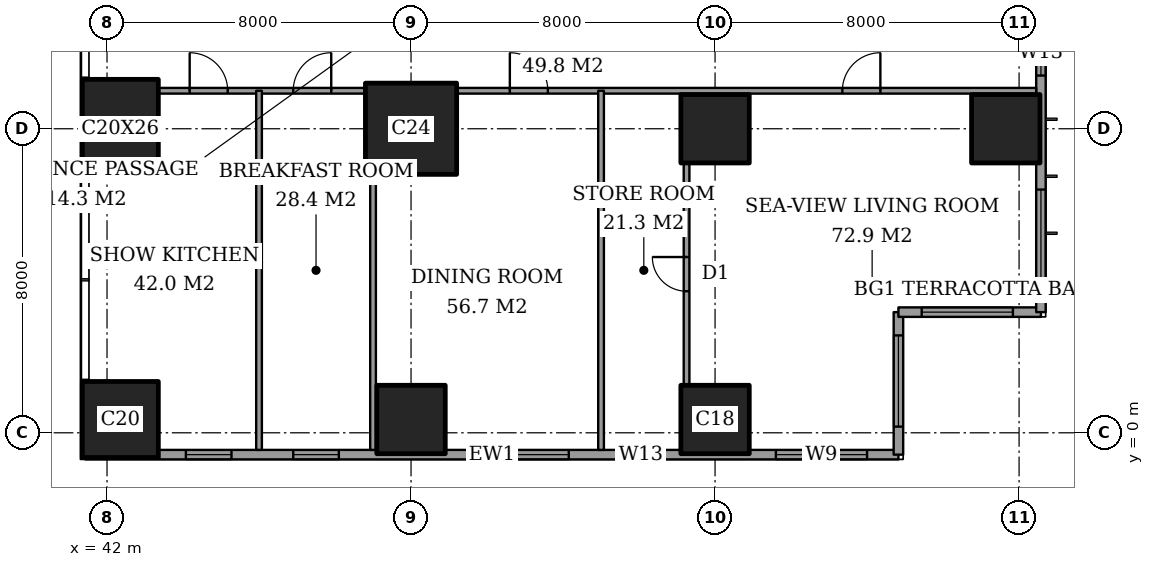
"""IFC4 building model, lengths in metres.
Left out: names, types, materials, properties, quantities, classifications, styles, units other than length and angle.
Written with IfcOpenShell. Run it as: python <this file> out.ifc"""

import sys

from ifc_helpers import new_model, si_unit, direction, frame, frame_2d, origin, origin_2d, place, context, subcontext, project, spatial, rectangle, extrude, element, fill, save


model = new_model("IFC4")
c1 = context("Model", 3, precision=1e-05, world=origin(), true_north=direction((0.0, 1.0)))
c2 = subcontext(c1, "Body", "Model", "MODEL_VIEW")
j1 = project(units=[si_unit("LENGTHUNIT", "METRE"), si_unit("PLANEANGLEUNIT", "RADIAN")], contexts=[c1])
p1 = place(None, origin())
s1 = spatial("IfcSite", under=j1, at=p1, CompositionType="ELEMENT")
p2 = place(p1, origin())
s2 = spatial("IfcBuilding", under=s1, at=p2, CompositionType="ELEMENT")
p3 = place(p2, frame((0.0, 0.0, 214.6)))
s3 = spatial("IfcBuildingStorey", under=s2, at=p3, CompositionType="ELEMENT", Elevation=214.6)
p4 = place(p3, frame((42.35, 0.35, 0.0), z_axis=(0.0, 0.0, 1.0), x_axis=(1.0, 0.0, 0.0)))
e1 = element("IfcColumn", 1, at=p4, inside=s3, PredefinedType="COLUMN", context=c2, shape_type="SweptSolid", body=[
    extrude(rectangle(XDim=2.0, YDim=2.0, at=origin_2d()), origin(), (0.0, 0.0, 1.0), 3.6),
])
p5 = place(p3, frame((42.35, 8.0, 0.0), z_axis=(0.0, 0.0, 1.0), x_axis=(1.0, 0.0, 0.0)))
e2 = element("IfcColumn", 2, at=p5, inside=s3, PredefinedType="COLUMN", context=c2, shape_type="SweptSolid", body=[
    extrude(rectangle(XDim=2.0, YDim=2.6, at=origin_2d()), origin(), (0.0, 0.0, 1.0), 3.6),
])
p6 = place(p3, frame((50.0, 0.35, 0.0), z_axis=(0.0, 0.0, 1.0), x_axis=(1.0, 0.0, 0.0)))
e3 = element("IfcColumn", 3, at=p6, inside=s3, PredefinedType="COLUMN", context=c2, shape_type="SweptSolid", body=[
    extrude(rectangle(XDim=1.8, YDim=1.8, at=origin_2d()), origin(), (0.0, 0.0, 1.0), 3.6),
])
p7 = place(p3, frame((50.0, 8.0, 0.0), z_axis=(0.0, 0.0, 1.0), x_axis=(1.0, 0.0, 0.0)))
e4 = element("IfcColumn", 4, at=p7, inside=s3, PredefinedType="COLUMN", context=c2, shape_type="SweptSolid", body=[
    extrude(rectangle(XDim=2.4, YDim=2.4, at=origin_2d()), origin(), (0.0, 0.0, 1.0), 3.6),
])
for number, where, z_axis, x_axis in (
    (5, (58.0, 0.35, 0.0), (0.0, 0.0, 1.0), (1.0, 0.0, 0.0)),
    (6, (58.0, 8.0, 0.0), (0.0, 0.0, 1.0), (1.0, 0.0, 0.0)),
    (7, (65.65, 8.0, 0.0), (0.0, 0.0, 1.0), (1.0, 0.0, 0.0)),
):
    element("IfcColumn", number, at=place(p3, frame(where, z_axis=z_axis, x_axis=x_axis)), inside=s3, PredefinedType="COLUMN", context=c2, shape_type="SweptSolid", body=[
        extrude(rectangle(XDim=1.8, YDim=1.8, at=origin_2d()), origin(), (0.0, 0.0, 1.0), 3.6),
    ])
p8 = place(p3, frame((41.425, -0.575, 0.0), z_axis=(0.0, 0.0, 1.0), x_axis=(1.0, 0.0, 0.0)))
e8 = element("IfcWall", 8, at=p8, inside=s3, PredefinedType="SOLIDWALL", context=c2, shape_type="SweptSolid", body=[
    extrude(rectangle(XDim=21.4, YDim=0.25, at=frame_2d((10.7, 0.0))), origin(), (0.0, 0.0, 1.0), 3.6),
])
p9 = place(p8, frame((2.65, 0.0, 0.2)))
e9 = element("IfcOpeningElement", 9, at=p9, cuts=e8, PredefinedType="OPENING", context=c2, shape_type="SweptSolid", body=[
    extrude(rectangle(XDim=1.2, YDim=2.4, at=frame_2d((0.6, 1.2))), frame((0.0, 0.135, 0.0), z_axis=(0.0, -1.0, 0.0), x_axis=(1.0, 0.0, 0.0)), (0.0, 0.0, 1.0), 0.27),
])
p10 = place(p8, frame((5.475, 0.0, 0.2)))
e10 = element("IfcOpeningElement", 10, at=p10, cuts=e8, PredefinedType="OPENING", context=c2, shape_type="SweptSolid", body=[
    extrude(rectangle(XDim=1.2, YDim=2.4, at=frame_2d((0.6, 1.2))), frame((0.0, 0.135, 0.0), z_axis=(0.0, -1.0, 0.0), x_axis=(1.0, 0.0, 0.0)), (0.0, 0.0, 1.0), 0.27),
])
p11 = place(p8, frame((10.325, 0.0, 0.2)))
e11 = element("IfcOpeningElement", 11, at=p11, cuts=e8, PredefinedType="OPENING", context=c2, shape_type="SweptSolid", body=[
    extrude(rectangle(XDim=2.4, YDim=2.4, at=frame_2d((1.2, 1.2))), frame((0.0, 0.135, 0.0), z_axis=(0.0, -1.0, 0.0), x_axis=(1.0, 0.0, 0.0)), (0.0, 0.0, 1.0), 0.27),
])
p12 = place(p8, frame((14.025, 0.0, 0.2)))
e12 = element("IfcOpeningElement", 12, at=p12, cuts=e8, PredefinedType="OPENING", context=c2, shape_type="SweptSolid", body=[
    extrude(rectangle(XDim=1.2, YDim=2.4, at=frame_2d((0.6, 1.2))), frame((0.0, 0.135, 0.0), z_axis=(0.0, -1.0, 0.0), x_axis=(1.0, 0.0, 0.0)), (0.0, 0.0, 1.0), 0.27),
])
p13 = place(p8, frame((18.175, 0.0, 0.2)))
e13 = element("IfcOpeningElement", 13, at=p13, cuts=e8, PredefinedType="OPENING", context=c2, shape_type="SweptSolid", body=[
    extrude(rectangle(XDim=2.4, YDim=2.4, at=frame_2d((1.2, 1.2))), frame((0.0, 0.135, 0.0), z_axis=(0.0, -1.0, 0.0), x_axis=(1.0, 0.0, 0.0)), (0.0, 0.0, 1.0), 0.27),
])
p14 = place(p3, frame((62.825, -0.575, 0.0), z_axis=(0.0, 0.0, 1.0), x_axis=(0.0, 1.0, 0.0)))
e14 = element("IfcWall", 14, at=p14, inside=s3, PredefinedType="SOLIDWALL", context=c2, shape_type="SweptSolid", body=[
    extrude(rectangle(XDim=3.75, YDim=0.25, at=frame_2d((1.875, 0.0))), origin(), (0.0, 0.0, 1.0), 3.6),
])
p15 = place(p14, frame((0.738, 0.0, 0.2)))
e15 = element("IfcOpeningElement", 15, at=p15, cuts=e14, PredefinedType="OPENING", context=c2, shape_type="SweptSolid", body=[
    extrude(rectangle(XDim=2.4, YDim=2.4, at=frame_2d((1.2, 1.2))), frame((0.0, 0.135, 0.0), z_axis=(0.0, -1.0, 0.0), x_axis=(1.0, 0.0, 0.0)), (0.0, 0.0, 1.0), 0.27),
])
p16 = place(p3, frame((62.825, 3.175, 0.0), z_axis=(0.0, 0.0, 1.0), x_axis=(1.0, 0.0, 0.0)))
e16 = element("IfcWall", 16, at=p16, inside=s3, PredefinedType="SOLIDWALL", context=c2, shape_type="SweptSolid", body=[
    extrude(rectangle(XDim=3.75, YDim=0.25, at=frame_2d((1.875, 0.0))), origin(), (0.0, 0.0, 1.0), 3.6),
])
p17 = place(p16, frame((0.613, 0.0, 0.2)))
e17 = element("IfcOpeningElement", 17, at=p17, cuts=e16, PredefinedType="OPENING", context=c2, shape_type="SweptSolid", body=[
    extrude(rectangle(XDim=2.4, YDim=2.4, at=frame_2d((1.2, 1.2))), frame((0.0, 0.135, 0.0), z_axis=(0.0, -1.0, 0.0), x_axis=(1.0, 0.0, 0.0)), (0.0, 0.0, 1.0), 0.27),
])
p18 = place(p3, frame((66.575, 3.175, 0.0), z_axis=(0.0, 0.0, 1.0), x_axis=(0.0, 1.0, 0.0)))
e18 = element("IfcWall", 18, at=p18, inside=s3, PredefinedType="SOLIDWALL", context=c2, shape_type="SweptSolid", body=[
    extrude(rectangle(XDim=41.65, YDim=0.25, at=frame_2d((20.825, 0.0))), origin(), (0.0, 0.0, 1.0), 3.6),
])
p19 = place(p18, frame((0.825, 0.0, 0.2)))
e19 = element("IfcOpeningElement", 19, at=p19, cuts=e18, PredefinedType="OPENING", context=c2, shape_type="SweptSolid", body=[
    extrude(rectangle(XDim=2.4, YDim=2.4, at=frame_2d((1.2, 1.2))), frame((0.0, 0.135, 0.0), z_axis=(0.0, -1.0, 0.0), x_axis=(1.0, 0.0, 0.0)), (0.0, 0.0, 1.0), 0.27),
])
p20 = place(p18, frame((6.225, 0.0, 0.2)))
e20 = element("IfcOpeningElement", 20, at=p20, cuts=e18, PredefinedType="OPENING", context=c2, shape_type="SweptSolid", body=[
    extrude(rectangle(XDim=1.2, YDim=2.4, at=frame_2d((0.6, 1.2))), frame((0.0, 0.135, 0.0), z_axis=(0.0, -1.0, 0.0), x_axis=(1.0, 0.0, 0.0)), (0.0, 0.0, 1.0), 0.27),
])
p21 = place(p18, frame((8.675, 0.0, 0.2)))
e21 = element("IfcOpeningElement", 21, at=p21, cuts=e18, PredefinedType="OPENING", context=c2, shape_type="SweptSolid", body=[
    extrude(rectangle(XDim=2.4, YDim=2.4, at=frame_2d((1.2, 1.2))), frame((0.0, 0.135, 0.0), z_axis=(0.0, -1.0, 0.0), x_axis=(1.0, 0.0, 0.0)), (0.0, 0.0, 1.0), 0.27),
])
p22 = place(p18, frame((15.675, 0.0, 0.2)))
e22 = element("IfcOpeningElement", 22, at=p22, cuts=e18, PredefinedType="OPENING", context=c2, shape_type="SweptSolid", body=[
    extrude(rectangle(XDim=2.4, YDim=2.4, at=frame_2d((1.2, 1.2))), frame((0.0, 0.135, 0.0), z_axis=(0.0, -1.0, 0.0), x_axis=(1.0, 0.0, 0.0)), (0.0, 0.0, 1.0), 0.27),
])
p23 = place(p18, frame((23.575, 0.0, 0.2)))
e23 = element("IfcOpeningElement", 23, at=p23, cuts=e18, PredefinedType="OPENING", context=c2, shape_type="SweptSolid", body=[
    extrude(rectangle(XDim=2.4, YDim=2.4, at=frame_2d((1.2, 1.2))), frame((0.0, 0.135, 0.0), z_axis=(0.0, -1.0, 0.0), x_axis=(1.0, 0.0, 0.0)), (0.0, 0.0, 1.0), 0.27),
])
p24 = place(p18, frame((30.775, 0.0, 0.2)))
e24 = element("IfcOpeningElement", 24, at=p24, cuts=e18, PredefinedType="OPENING", context=c2, shape_type="SweptSolid", body=[
    extrude(rectangle(XDim=2.4, YDim=2.4, at=frame_2d((1.2, 1.2))), frame((0.0, 0.135, 0.0), z_axis=(0.0, -1.0, 0.0), x_axis=(1.0, 0.0, 0.0)), (0.0, 0.0, 1.0), 0.27),
])
p25 = place(p18, frame((34.55, 0.0, 0.2)))
e25 = element("IfcOpeningElement", 25, at=p25, cuts=e18, PredefinedType="OPENING", context=c2, shape_type="SweptSolid", body=[
    extrude(rectangle(XDim=1.2, YDim=2.4, at=frame_2d((0.6, 1.2))), frame((0.0, 0.135, 0.0), z_axis=(0.0, -1.0, 0.0), x_axis=(1.0, 0.0, 0.0)), (0.0, 0.0, 1.0), 0.27),
])
p26 = place(p18, frame((38.425, 0.0, 0.2)))
e26 = element("IfcOpeningElement", 26, at=p26, cuts=e18, PredefinedType="OPENING", context=c2, shape_type="SweptSolid", body=[
    extrude(rectangle(XDim=2.4, YDim=2.4, at=frame_2d((1.2, 1.2))), frame((0.0, 0.135, 0.0), z_axis=(0.0, -1.0, 0.0), x_axis=(1.0, 0.0, 0.0)), (0.0, 0.0, 1.0), 0.27),
])
p27 = place(p3, frame((43.35, 9.0, 0.0), z_axis=(0.0, 0.0, 1.0), x_axis=(1.0, 0.0, 0.0)))
e27 = element("IfcWall", 27, at=p27, inside=s3, PredefinedType="PARTITIONING", context=c2, shape_type="SweptSolid", body=[
    extrude(rectangle(XDim=5.45, YDim=0.15, at=frame_2d((2.725, 0.0))), origin(), (0.0, 0.0, 1.0), 3.35),
])
p28 = place(p27, frame((3.55, 0.0, 0.0)))
e28 = element("IfcOpeningElement", 28, at=p28, cuts=e27, PredefinedType="OPENING", context=c2, shape_type="SweptSolid", body=[
    extrude(rectangle(XDim=1.0, YDim=2.1, at=frame_2d((0.5, 1.05))), frame((0.0, 0.085, 0.0), z_axis=(0.0, -1.0, 0.0), x_axis=(1.0, 0.0, 0.0)), (0.0, 0.0, 1.0), 0.17),
])
p29 = place(p27, frame((0.825, 0.0, 0.0)))
e29 = element("IfcOpeningElement", 29, at=p29, cuts=e27, PredefinedType="OPENING", context=c2, shape_type="SweptSolid", body=[
    extrude(rectangle(XDim=1.0, YDim=2.1, at=frame_2d((0.5, 1.05))), frame((0.0, 0.085, 0.0), z_axis=(0.0, -1.0, 0.0), x_axis=(1.0, 0.0, 0.0)), (0.0, 0.0, 1.0), 0.17),
])
p30 = place(p3, frame((51.2, 9.0, 0.0), z_axis=(0.0, 0.0, 1.0), x_axis=(1.0, 0.0, 0.0)))
e30 = element("IfcWall", 30, at=p30, inside=s3, PredefinedType="PARTITIONING", context=c2, shape_type="SweptSolid", body=[
    extrude(rectangle(XDim=15.25, YDim=0.15, at=frame_2d((7.625, 0.0))), origin(), (0.0, 0.0, 1.0), 3.35),
])
p31 = place(p30, frame((10.15, 0.0, 0.0)))
e31 = element("IfcOpeningElement", 31, at=p31, cuts=e30, PredefinedType="OPENING", context=c2, shape_type="SweptSolid", body=[
    extrude(rectangle(XDim=1.0, YDim=2.1, at=frame_2d((0.5, 1.05))), frame((0.0, 0.085, 0.0), z_axis=(0.0, -1.0, 0.0), x_axis=(1.0, 0.0, 0.0)), (0.0, 0.0, 1.0), 0.17),
])
p32 = place(p30, frame((1.4, 0.0, 0.0)))
e32 = element("IfcOpeningElement", 32, at=p32, cuts=e30, PredefinedType="OPENING", context=c2, shape_type="SweptSolid", body=[
    extrude(rectangle(XDim=1.0, YDim=2.1, at=frame_2d((0.5, 1.05))), frame((0.0, 0.085, 0.0), z_axis=(0.0, -1.0, 0.0), x_axis=(1.0, 0.0, 0.0)), (0.0, 0.0, 1.0), 0.17),
])
p33 = place(p3, frame((46.0, -0.45, 0.0), z_axis=(0.0, 0.0, 1.0), x_axis=(0.0, 1.0, 0.0)))
e33 = element("IfcWall", 33, at=p33, inside=s3, PredefinedType="PARTITIONING", context=c2, shape_type="SweptSolid", body=[
    extrude(rectangle(XDim=9.45, YDim=0.15, at=frame_2d((4.725, 0.0))), origin(), (0.0, 0.0, 1.0), 3.35),
])
p34 = place(p3, frame((49.0, -0.45, 0.0), z_axis=(0.0, 0.0, 1.0), x_axis=(0.0, 1.0, 0.0)))
e34 = element("IfcWall", 34, at=p34, inside=s3, PredefinedType="PARTITIONING", context=c2, shape_type="SweptSolid", body=[
    extrude(rectangle(XDim=7.25, YDim=0.15, at=frame_2d((3.625, 0.0))), origin(), (0.0, 0.0, 1.0), 3.35),
])
p35 = place(p3, frame((55.0, -0.45, 0.0), z_axis=(0.0, 0.0, 1.0), x_axis=(0.0, 1.0, 0.0)))
e35 = element("IfcWall", 35, at=p35, inside=s3, PredefinedType="PARTITIONING", context=c2, shape_type="SweptSolid", body=[
    extrude(rectangle(XDim=9.45, YDim=0.15, at=frame_2d((4.725, 0.0))), origin(), (0.0, 0.0, 1.0), 3.35),
])
p36 = place(p3, frame((57.25, 1.25, 0.0), z_axis=(0.0, 0.0, 1.0), x_axis=(0.0, 1.0, 0.0)))
e36 = element("IfcWall", 36, at=p36, inside=s3, PredefinedType="PARTITIONING", context=c2, shape_type="SweptSolid", body=[
    extrude(rectangle(XDim=5.85, YDim=0.15, at=frame_2d((2.925, 0.0))), origin(), (0.0, 0.0, 1.0), 3.35),
])
p37 = place(p36, frame((2.475, 0.0, 0.0)))
e37 = element("IfcOpeningElement", 37, at=p37, cuts=e36, PredefinedType="OPENING", context=c2, shape_type="SweptSolid", body=[
    extrude(rectangle(XDim=0.9, YDim=2.1, at=frame_2d((0.45, 1.05))), frame((0.0, 0.085, 0.0), z_axis=(0.0, -1.0, 0.0), x_axis=(1.0, 0.0, 0.0)), (0.0, 0.0, 1.0), 0.17),
])
p38 = place(p9, origin())
e38 = element("IfcWindow", 38, at=p38, inside=s3, PartitioningType="SINGLE_PANEL", PredefinedType="WINDOW", context=c2, shape_type="SweptSolid", body=[
    extrude(rectangle(XDim=1.2, YDim=2.4, at=frame_2d((0.6, 1.2))), frame((0.0, 0.03, 0.0), z_axis=(0.0, -1.0, 0.0), x_axis=(1.0, 0.0, 0.0)), (0.0, 0.0, 1.0), 0.06),
])
fill(e9, e38)
p39 = place(p10, origin())
e39 = element("IfcWindow", 39, at=p39, inside=s3, PartitioningType="SINGLE_PANEL", PredefinedType="WINDOW", context=c2, shape_type="SweptSolid", body=[
    extrude(rectangle(XDim=1.2, YDim=2.4, at=frame_2d((0.6, 1.2))), frame((0.0, 0.03, 0.0), z_axis=(0.0, -1.0, 0.0), x_axis=(1.0, 0.0, 0.0)), (0.0, 0.0, 1.0), 0.06),
])
fill(e10, e39)
p40 = place(p11, origin())
e40 = element("IfcWindow", 40, at=p40, inside=s3, PartitioningType="SINGLE_PANEL", PredefinedType="WINDOW", context=c2, shape_type="SweptSolid", body=[
    extrude(rectangle(XDim=2.4, YDim=2.4, at=frame_2d((1.2, 1.2))), frame((0.0, 0.03, 0.0), z_axis=(0.0, -1.0, 0.0), x_axis=(1.0, 0.0, 0.0)), (0.0, 0.0, 1.0), 0.06),
])
fill(e11, e40)
p41 = place(p12, origin())
e41 = element("IfcWindow", 41, at=p41, inside=s3, PartitioningType="SINGLE_PANEL", PredefinedType="WINDOW", context=c2, shape_type="SweptSolid", body=[
    extrude(rectangle(XDim=1.2, YDim=2.4, at=frame_2d((0.6, 1.2))), frame((0.0, 0.03, 0.0), z_axis=(0.0, -1.0, 0.0), x_axis=(1.0, 0.0, 0.0)), (0.0, 0.0, 1.0), 0.06),
])
fill(e12, e41)
p42 = place(p13, origin())
e42 = element("IfcWindow", 42, at=p42, inside=s3, PartitioningType="SINGLE_PANEL", PredefinedType="WINDOW", context=c2, shape_type="SweptSolid", body=[
    extrude(rectangle(XDim=2.4, YDim=2.4, at=frame_2d((1.2, 1.2))), frame((0.0, 0.03, 0.0), z_axis=(0.0, -1.0, 0.0), x_axis=(1.0, 0.0, 0.0)), (0.0, 0.0, 1.0), 0.06),
])
fill(e13, e42)
p43 = place(p15, origin())
e43 = element("IfcWindow", 43, at=p43, inside=s3, PartitioningType="SINGLE_PANEL", PredefinedType="WINDOW", context=c2, shape_type="SweptSolid", body=[
    extrude(rectangle(XDim=2.4, YDim=2.4, at=frame_2d((1.2, 1.2))), frame((0.0, 0.03, 0.0), z_axis=(0.0, -1.0, 0.0), x_axis=(1.0, 0.0, 0.0)), (0.0, 0.0, 1.0), 0.06),
])
fill(e15, e43)
p44 = place(p17, origin())
e44 = element("IfcWindow", 44, at=p44, inside=s3, PartitioningType="SINGLE_PANEL", PredefinedType="WINDOW", context=c2, shape_type="SweptSolid", body=[
    extrude(rectangle(XDim=2.4, YDim=2.4, at=frame_2d((1.2, 1.2))), frame((0.0, 0.03, 0.0), z_axis=(0.0, -1.0, 0.0), x_axis=(1.0, 0.0, 0.0)), (0.0, 0.0, 1.0), 0.06),
])
fill(e17, e44)
p45 = place(p19, origin())
e45 = element("IfcWindow", 45, at=p45, inside=s3, PartitioningType="SINGLE_PANEL", PredefinedType="WINDOW", context=c2, shape_type="SweptSolid", body=[
    extrude(rectangle(XDim=2.4, YDim=2.4, at=frame_2d((1.2, 1.2))), frame((0.0, 0.03, 0.0), z_axis=(0.0, -1.0, 0.0), x_axis=(1.0, 0.0, 0.0)), (0.0, 0.0, 1.0), 0.06),
])
fill(e19, e45)
p46 = place(p20, origin())
e46 = element("IfcWindow", 46, at=p46, inside=s3, PartitioningType="SINGLE_PANEL", PredefinedType="WINDOW", context=c2, shape_type="SweptSolid", body=[
    extrude(rectangle(XDim=1.2, YDim=2.4, at=frame_2d((0.6, 1.2))), frame((0.0, 0.03, 0.0), z_axis=(0.0, -1.0, 0.0), x_axis=(1.0, 0.0, 0.0)), (0.0, 0.0, 1.0), 0.06),
])
fill(e20, e46)
p47 = place(p31, origin())
e47 = element("IfcDoor", 47, at=p47, inside=s3, OperationType="SINGLE_SWING_LEFT", PredefinedType="DOOR", context=c2, shape_type="SweptSolid", body=[
    extrude(rectangle(XDim=1.0, YDim=2.1, at=frame_2d((0.5, 1.05))), frame((0.0, 0.025, 0.0), z_axis=(0.0, -1.0, 0.0), x_axis=(1.0, 0.0, 0.0)), (0.0, 0.0, 1.0), 0.05),
])
fill(e31, e47)
p48 = place(p37, origin())
e48 = element("IfcDoor", 48, at=p48, inside=s3, OperationType="SINGLE_SWING_LEFT", PredefinedType="DOOR", context=c2, shape_type="SweptSolid", body=[
    extrude(rectangle(XDim=0.9, YDim=2.1, at=frame_2d((0.45, 1.05))), frame((0.0, 0.025, 0.0), z_axis=(0.0, -1.0, 0.0), x_axis=(1.0, 0.0, 0.0)), (0.0, 0.0, 1.0), 0.05),
])
fill(e37, e48)
p49 = place(p32, origin())
e49 = element("IfcDoor", 49, at=p49, inside=s3, OperationType="SINGLE_SWING_RIGHT", PredefinedType="DOOR", context=c2, shape_type="SweptSolid", body=[
    extrude(rectangle(XDim=1.0, YDim=2.1, at=frame_2d((0.5, 1.05))), frame((0.0, 0.025, 0.0), z_axis=(0.0, -1.0, 0.0), x_axis=(1.0, 0.0, 0.0)), (0.0, 0.0, 1.0), 0.05),
])
fill(e32, e49)
p50 = place(p28, origin())
e50 = element("IfcDoor", 50, at=p50, inside=s3, OperationType="SINGLE_SWING_LEFT", PredefinedType="DOOR", context=c2, shape_type="SweptSolid", body=[
    extrude(rectangle(XDim=1.0, YDim=2.1, at=frame_2d((0.5, 1.05))), frame((0.0, 0.025, 0.0), z_axis=(0.0, -1.0, 0.0), x_axis=(1.0, 0.0, 0.0)), (0.0, 0.0, 1.0), 0.05),
])
fill(e28, e50)
p51 = place(p29, origin())
e51 = element("IfcDoor", 51, at=p51, inside=s3, OperationType="SINGLE_SWING_RIGHT", PredefinedType="DOOR", context=c2, shape_type="SweptSolid", body=[
    extrude(rectangle(XDim=1.0, YDim=2.1, at=frame_2d((0.5, 1.05))), frame((0.0, 0.025, 0.0), z_axis=(0.0, -1.0, 0.0), x_axis=(1.0, 0.0, 0.0)), (0.0, 0.0, 1.0), 0.05),
])
fill(e29, e51)
save(model, sys.argv[1])
